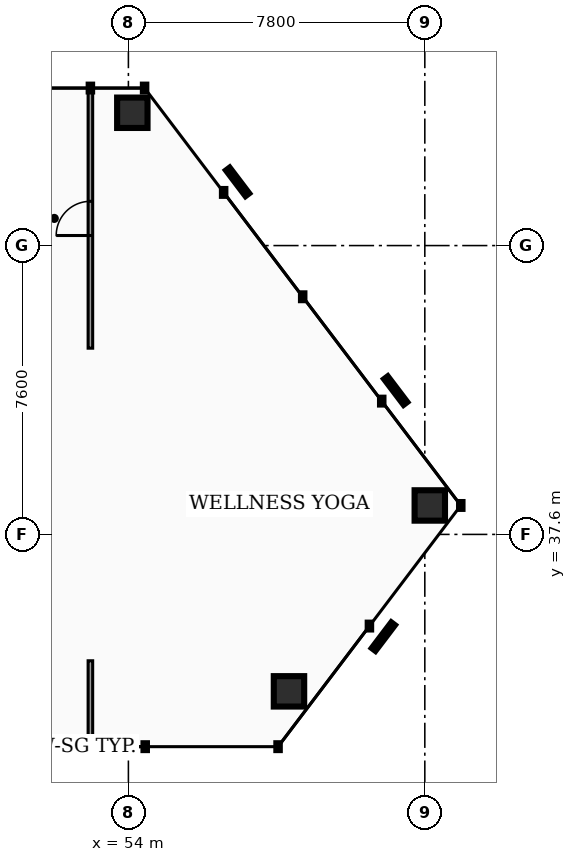
"""IFC4 building model, lengths in metres.
Left out: names, types, materials, properties, quantities, classifications, styles, units other than length and angle.
Written with IfcOpenShell. Run it as: python <this file> out.ifc"""

import sys

from ifc_helpers import new_model, si_unit, direction, frame, frame_2d, origin, origin_2d, place, context, subcontext, project, spatial, rectangle, hollow_rectangle, extrude, element, fill, save


model = new_model("IFC4")
c1 = context("Model", 3, precision=1e-05, world=origin(), true_north=direction((0.0, 1.0)))
c2 = subcontext(c1, "Body", "Model", "MODEL_VIEW")
j1 = project(units=[si_unit("LENGTHUNIT", "METRE"), si_unit("PLANEANGLEUNIT", "RADIAN")], contexts=[c1])
p1 = place(None, origin())
s1 = spatial("IfcSite", under=j1, at=p1, CompositionType="ELEMENT")
p2 = place(p1, origin())
s2 = spatial("IfcBuilding", under=s1, at=p2, CompositionType="ELEMENT")
p3 = place(p2, frame((0.0, 0.0, 119.0)))
s3 = spatial("IfcBuildingStorey", under=s2, at=p3, CompositionType="ELEMENT", Elevation=119.0)
p4 = place(p3, frame((54.103, 48.694, 0.0), z_axis=(0.074251571409, -0.018519215457, 0.997067571834), x_axis=(0.241998410475, 0.970276645771, 0.0)))
e1 = element("IfcColumn", 1, at=p4, inside=s3, PredefinedType="COLUMN", context=c2, shape_type="SweptSolid", body=[
    extrude(hollow_rectangle(XDim=0.8, YDim=0.8, WallThickness=0.04, at=origin_2d()), origin(), (0.0, 0.0, 1.0), 4.192),
])
p5 = place(p3, frame((58.226, 33.471, 0.0), z_axis=(-0.003909652616, 0.043122884822, 0.999062125907), x_axis=(-0.995915269482, -0.090292724026, 0.0)))
e2 = element("IfcColumn", 2, at=p5, inside=s3, PredefinedType="COLUMN", context=c2, shape_type="SweptSolid", body=[
    extrude(hollow_rectangle(XDim=0.8, YDim=0.8, WallThickness=0.04, at=origin_2d()), origin(), (0.0, 0.0, 1.0), 4.184),
])
p6 = place(p3, frame((61.931, 38.362, 0.0), z_axis=(0.011890012383, 0.063879674371, 0.997886774543), x_axis=(-0.983115041424, 0.182988566105, 0.0)))
e3 = element("IfcColumn", 3, at=p6, inside=s3, PredefinedType="COLUMN", context=c2, shape_type="SweptSolid", body=[
    extrude(hollow_rectangle(XDim=0.8, YDim=0.8, WallThickness=0.04, at=origin_2d()), origin(), (0.0, 0.0, 1.0), 4.189),
])
p7 = place(p3, frame((53.0, 42.5, 0.0), z_axis=(0.0, 0.0, 1.0), x_axis=(0.0, 1.0, 0.0)))
e4 = element("IfcWall", 4, at=p7, inside=s3, PredefinedType="PARTITIONING", context=c2, shape_type="SweptSolid", body=[
    extrude(rectangle(XDim=6.829, YDim=0.12, at=frame_2d((3.415, 0.0))), origin(), (0.0, 0.0, 1.0), 3.137),
])
p8 = place(p7, frame((2.965, 0.0, 0.0)))
e5 = element("IfcOpeningElement", 5, at=p8, cuts=e4, PredefinedType="OPENING", context=c2, shape_type="SweptSolid", body=[
    extrude(rectangle(XDim=0.9, YDim=2.05, at=frame_2d((0.45, 1.025))), frame((0.0, 0.07, 0.0), z_axis=(0.0, -1.0, 0.0), x_axis=(1.0, 0.0, 0.0)), (0.0, 0.0, 1.0), 0.14),
])
p9 = place(p3, frame((53.0, 32.03, 0.0), z_axis=(0.0, 0.0, 1.0), x_axis=(0.0, 1.0, 0.0)))
e6 = element("IfcWall", 6, at=p9, inside=s3, PredefinedType="PARTITIONING", context=c2, shape_type="SweptSolid", body=[
    extrude(rectangle(XDim=2.245, YDim=0.12, at=frame_2d((1.123, 0.0))), origin(), (0.0, 0.0, 1.0), 3.137),
])
p10 = place(p8, origin())
e7 = element("IfcDoor", 7, at=p10, inside=s3, OperationType="SINGLE_SWING_LEFT", PredefinedType="DOOR", context=c2, shape_type="SweptSolid", body=[
    extrude(rectangle(XDim=0.9, YDim=2.05, at=frame_2d((0.45, 1.025))), frame((0.0, 0.025, 0.0), z_axis=(0.0, -1.0, 0.0), x_axis=(1.0, 0.0, 0.0)), (0.0, 0.0, 1.0), 0.05),
])
fill(e5, e7)
save(model, sys.argv[1])
